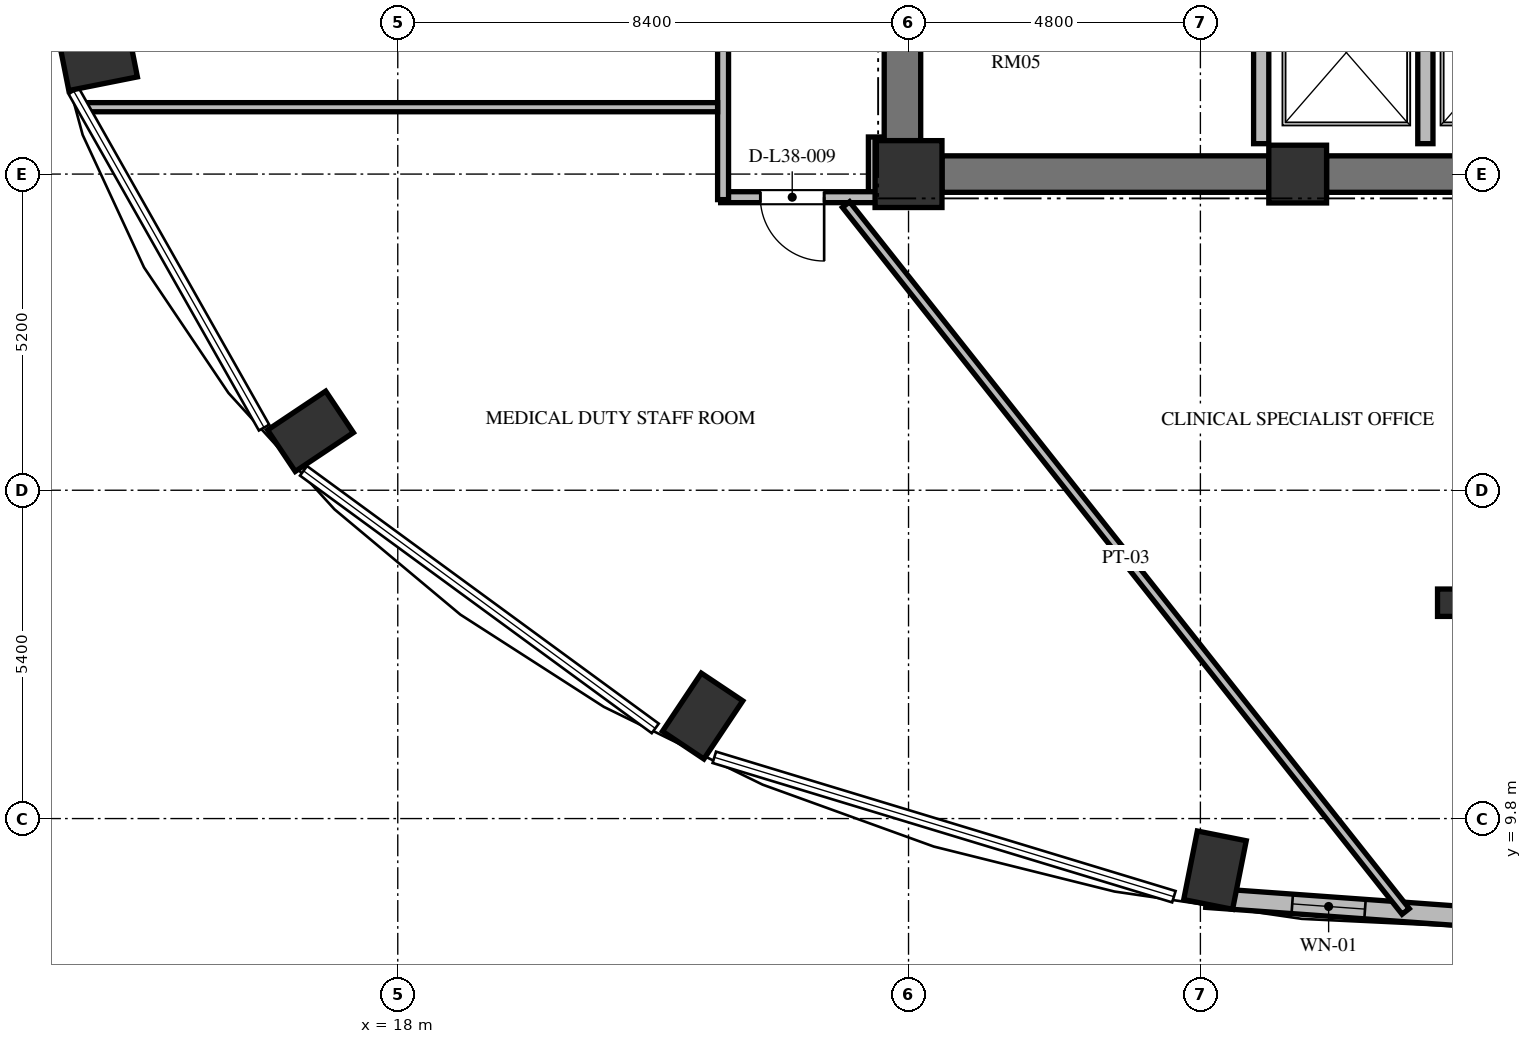
"""IFC4 building model, lengths in metres.
Left out: names, types, materials, properties, quantities, classifications, styles, units other than length and angle.
Written with IfcOpenShell. Run it as: python <this file> out.ifc"""

import sys

from ifc_helpers import new_model, si_unit, direction, frame, frame_2d, origin, origin_2d, place, context, subcontext, project, spatial, rectangle, extrude, element, fill, save


model = new_model("IFC4")
c1 = context("Model", 3, precision=1e-05, world=origin(), true_north=direction((0.0, 1.0)))
c2 = subcontext(c1, "Body", "Model", "MODEL_VIEW")
j1 = project(units=[si_unit("LENGTHUNIT", "METRE"), si_unit("PLANEANGLEUNIT", "RADIAN")], contexts=[c1])
p1 = place(None, origin())
s1 = spatial("IfcSite", under=j1, at=p1, CompositionType="ELEMENT")
p2 = place(p1, origin())
s2 = spatial("IfcBuilding", under=s1, at=p2, CompositionType="ELEMENT")
p3 = place(p2, frame((0.0, 0.0, 149.232)))
s3 = spatial("IfcBuildingStorey", under=s2, at=p3, CompositionType="ELEMENT", Elevation=149.232)
for number, where, z_axis, x_axis in (
    (1, (13.074, 22.288, 0.0), (0.0, 0.0, 1.0), (-0.981, -0.195, 0.0)),
    (2, (16.564, 16.169, 0.0), (0.0, 0.0, 1.0), (-0.831, -0.556, 0.0)),
    (3, (23.013, 11.486, 0.0), (0.0, 0.0, 1.0), (-0.556, -0.831, 0.0)),
    (4, (31.44, 8.951, 0.0), (0.0, 0.0, 1.0), (-0.195, -0.981, 0.0)),
):
    element("IfcColumn", number, at=place(p3, frame(where, z_axis=z_axis, x_axis=x_axis)), inside=s3, PredefinedType="COLUMN", context=c2, shape_type="SweptSolid", body=[
        extrude(rectangle(XDim=1.15, YDim=0.82, at=origin_2d()), origin(), (0.0, 0.0, 1.0), 3.648),
    ])
p4 = place(p3, frame((26.4, 20.4, 0.0), z_axis=(0.0, 0.0, 1.0), x_axis=(1.0, 0.0, 0.0)))
e5 = element("IfcColumn", 5, at=p4, inside=s3, PredefinedType="COLUMN", context=c2, shape_type="SweptSolid", body=[
    extrude(rectangle(XDim=1.1, YDim=1.1, at=origin_2d()), origin(), (0.0, 0.0, 1.0), 3.648),
])
p5 = place(p3, frame((32.8, 20.4, 0.0), z_axis=(0.0, 0.0, 1.0), x_axis=(1.0, 0.0, 0.0)))
e6 = element("IfcColumn", 6, at=p5, inside=s3, PredefinedType="COLUMN", context=c2, shape_type="SweptSolid", body=[
    extrude(rectangle(XDim=0.95, YDim=0.95, at=origin_2d()), origin(), (0.0, 0.0, 1.0), 3.648),
])
p6 = place(p3, frame((35.4, 13.35, 0.0), z_axis=(0.0, 0.0, 1.0), x_axis=(1.0, 0.0, 0.0)))
e7 = element("IfcColumn", 7, at=p6, inside=s3, PredefinedType="PILASTER", context=c2, shape_type="SweptSolid", body=[
    extrude(rectangle(XDim=0.6, YDim=0.45, at=origin_2d()), origin(), (0.0, 0.0, 1.0), 3.648),
])
p7 = place(p3, frame((26.3, 20.95, 0.0), z_axis=(0.0, 0.0, 1.0), x_axis=(0.0, 1.0, 0.0)))
e8 = element("IfcWall", 8, at=p7, inside=s3, PredefinedType="SHEAR", context=c2, shape_type="SweptSolid", body=[
    extrude(rectangle(XDim=14.1, YDim=0.6, at=frame_2d((7.05, 0.0))), origin(), (0.0, 0.0, 1.0), 3.648),
])
p8 = place(p7, frame((6.5, 0.0, 0.0)))
e9 = element("IfcOpeningElement", 9, at=p8, cuts=e8, PredefinedType="OPENING", context=c2, shape_type="SweptSolid", body=[
    extrude(rectangle(XDim=1.2, YDim=2.15, at=frame_2d((0.6, 1.075))), frame((0.0, 0.31, 0.0), z_axis=(0.0, -1.0, 0.0), x_axis=(1.0, 0.0, 0.0)), (0.0, 0.0, 1.0), 0.62),
])
p9 = place(p7, frame((9.6, 0.0, 0.0)))
e10 = element("IfcOpeningElement", 10, at=p9, cuts=e8, PredefinedType="OPENING", context=c2, shape_type="SweptSolid", body=[
    extrude(rectangle(XDim=1.3, YDim=2.2, at=frame_2d((0.65, 1.1))), frame((0.0, 0.31, 0.0), z_axis=(0.0, -1.0, 0.0), x_axis=(1.0, 0.0, 0.0)), (0.0, 0.0, 1.0), 0.62),
])
p10 = place(p7, frame((3.26, 0.0, 0.0)))
e11 = element("IfcOpeningElement", 11, at=p10, cuts=e8, PredefinedType="OPENING", context=c2, shape_type="SweptSolid", body=[
    extrude(rectangle(XDim=1.3, YDim=2.2, at=frame_2d((0.65, 1.1))), frame((0.0, 0.31, 0.0), z_axis=(0.0, -1.0, 0.0), x_axis=(1.0, 0.0, 0.0)), (0.0, 0.0, 1.0), 0.62),
])
p11 = place(p3, frame((26.95, 20.4, 0.0), z_axis=(0.0, 0.0, 1.0), x_axis=(1.0, 0.0, 0.0)))
e12 = element("IfcWall", 12, at=p11, inside=s3, PredefinedType="SHEAR", context=c2, shape_type="SweptSolid", body=[
    extrude(rectangle(XDim=5.375, YDim=0.6, at=frame_2d((2.688, 0.0))), origin(), (0.0, 0.0, 1.0), 3.648),
])
p12 = place(p3, frame((33.275, 20.4, 0.0), z_axis=(0.0, 0.0, 1.0), x_axis=(1.0, 0.0, 0.0)))
e13 = element("IfcWall", 13, at=p12, inside=s3, PredefinedType="SHEAR", context=c2, shape_type="SweptSolid", body=[
    extrude(rectangle(XDim=5.45, YDim=0.6, at=frame_2d((2.725, 0.0))), origin(), (0.0, 0.0, 1.0), 3.648),
])
p13 = place(p3, frame((31.299, 8.499, 0.0), z_axis=(0.0, 0.0, 1.0), x_axis=(0.997415202861, -0.071853413984, 0.0)))
e14 = element("IfcWall", 14, at=p13, inside=s3, PredefinedType="SOLIDWALL", context=c2, shape_type="SweptSolid", body=[
    extrude(rectangle(XDim=4.893, YDim=0.32, at=frame_2d((2.446, 0.0))), origin(), (0.0, 0.0, 1.0), 3.428),
])
p14 = place(p13, frame((1.415, 0.0, 0.85)))
e15 = element("IfcOpeningElement", 15, at=p14, cuts=e14, PredefinedType="OPENING", context=c2, shape_type="SweptSolid", body=[
    extrude(rectangle(XDim=1.2, YDim=2.2, at=frame_2d((0.6, 1.1))), frame((0.0, 0.17, 0.0), z_axis=(0.0, -1.0, 0.0), x_axis=(1.0, 0.0, 0.0)), (0.0, 0.0, 1.0), 0.34),
])
for number, where, z_axis, x_axis in (
    (16, (32.2, 20.9, 0.0), (0.0, 0.0, 1.0), (0.0, 1.0, 0.0)),
    (17, (34.9, 20.9, 0.0), (0.0, 0.0, 1.0), (0.0, 1.0, 0.0)),
):
    element("IfcWall", number, at=place(p3, frame(where, z_axis=z_axis, x_axis=x_axis)), inside=s3, PredefinedType="SOLIDWALL", context=c2, shape_type="SweptSolid", body=[
        extrude(rectangle(XDim=2.8, YDim=0.25, at=frame_2d((1.4, 0.0))), origin(), (0.0, 0.0, 1.0), 3.428),
    ])
p15 = place(p3, frame((25.83, 21.01, 0.0), z_axis=(0.0, 0.0, 1.0), x_axis=(0.0, -1.0, 0.0)))
e18 = element("IfcWall", 18, at=p15, inside=s3, PredefinedType="PARTITIONING", context=c2, shape_type="SweptSolid", body=[
    extrude(rectangle(XDim=1.03, YDim=0.18, at=frame_2d((0.515, 0.0))), origin(), (0.0, 0.0, 1.0), 3.428),
])
p16 = place(p3, frame((25.87, 20.02, 0.0), z_axis=(0.0, 0.0, 1.0), x_axis=(-1.0, 0.0, 0.0)))
e19 = element("IfcWall", 19, at=p16, inside=s3, PredefinedType="PARTITIONING", context=c2, shape_type="SweptSolid", body=[
    extrude(rectangle(XDim=2.56, YDim=0.18, at=frame_2d((1.28, 0.0))), origin(), (0.0, 0.0, 1.0), 3.428),
])
p17 = place(p16, frame((0.858, 0.0, 0.0)))
e20 = element("IfcOpeningElement", 20, at=p17, cuts=e19, PredefinedType="OPENING", context=c2, shape_type="SweptSolid", body=[
    extrude(rectangle(XDim=1.05, YDim=2.15, at=frame_2d((0.525, 1.075))), frame((0.0, 0.1, 0.0), z_axis=(0.0, -1.0, 0.0), x_axis=(1.0, 0.0, 0.0)), (0.0, 0.0, 1.0), 0.2),
])
p18 = place(p3, frame((23.35, 19.98, 0.0), z_axis=(0.0, 0.0, 1.0), x_axis=(0.0, 1.0, 0.0)))
e21 = element("IfcWall", 21, at=p18, inside=s3, PredefinedType="PARTITIONING", context=c2, shape_type="SweptSolid", body=[
    extrude(rectangle(XDim=5.06, YDim=0.18, at=frame_2d((2.53, 0.0))), origin(), (0.0, 0.0, 1.0), 3.428),
])
p19 = place(p3, frame((12.829, 21.5, 0.0), z_axis=(0.0, 0.0, 1.0), x_axis=(1.0, 0.0, 0.0)))
e22 = element("IfcWall", 22, at=p19, inside=s3, PredefinedType="PARTITIONING", context=c2, shape_type="SweptSolid", body=[
    extrude(rectangle(XDim=10.431, YDim=0.15, at=frame_2d((5.216, 0.0))), origin(), (0.0, 0.0, 1.0), 2.863),
])
p20 = place(p3, frame((25.372, 19.898, 0.0), z_axis=(0.0, 0.0, 1.0), x_axis=(0.620699148788, -0.784048829279, 0.0)))
e23 = element("IfcWall", 23, at=p20, inside=s3, PredefinedType="PARTITIONING", context=c2, shape_type="SweptSolid", body=[
    extrude(rectangle(XDim=14.828, YDim=0.15, at=frame_2d((7.414, 0.0))), origin(), (0.0, 0.0, 1.0), 3.428),
])
p21 = place(p14, origin())
e24 = element("IfcWindow", 24, at=p21, inside=s3, PartitioningType="SINGLE_PANEL", PredefinedType="WINDOW", context=c2, shape_type="SweptSolid", body=[
    extrude(rectangle(XDim=1.2, YDim=2.2, at=frame_2d((0.6, 1.1))), frame((0.0, 0.03, 0.0), z_axis=(0.0, -1.0, 0.0), x_axis=(1.0, 0.0, 0.0)), (0.0, 0.0, 1.0), 0.06),
])
fill(e15, e24)
p22 = place(p17, origin())
e25 = element("IfcDoor", 25, at=p22, inside=s3, OperationType="SINGLE_SWING_LEFT", PredefinedType="DOOR", context=c2, shape_type="SweptSolid", body=[
    extrude(rectangle(XDim=1.05, YDim=2.15, at=frame_2d((0.525, 1.075))), frame((0.0, 0.025, 0.0), z_axis=(0.0, -1.0, 0.0), x_axis=(1.0, 0.0, 0.0)), (0.0, 0.0, 1.0), 0.05),
])
fill(e20, e25)
save(model, sys.argv[1])
